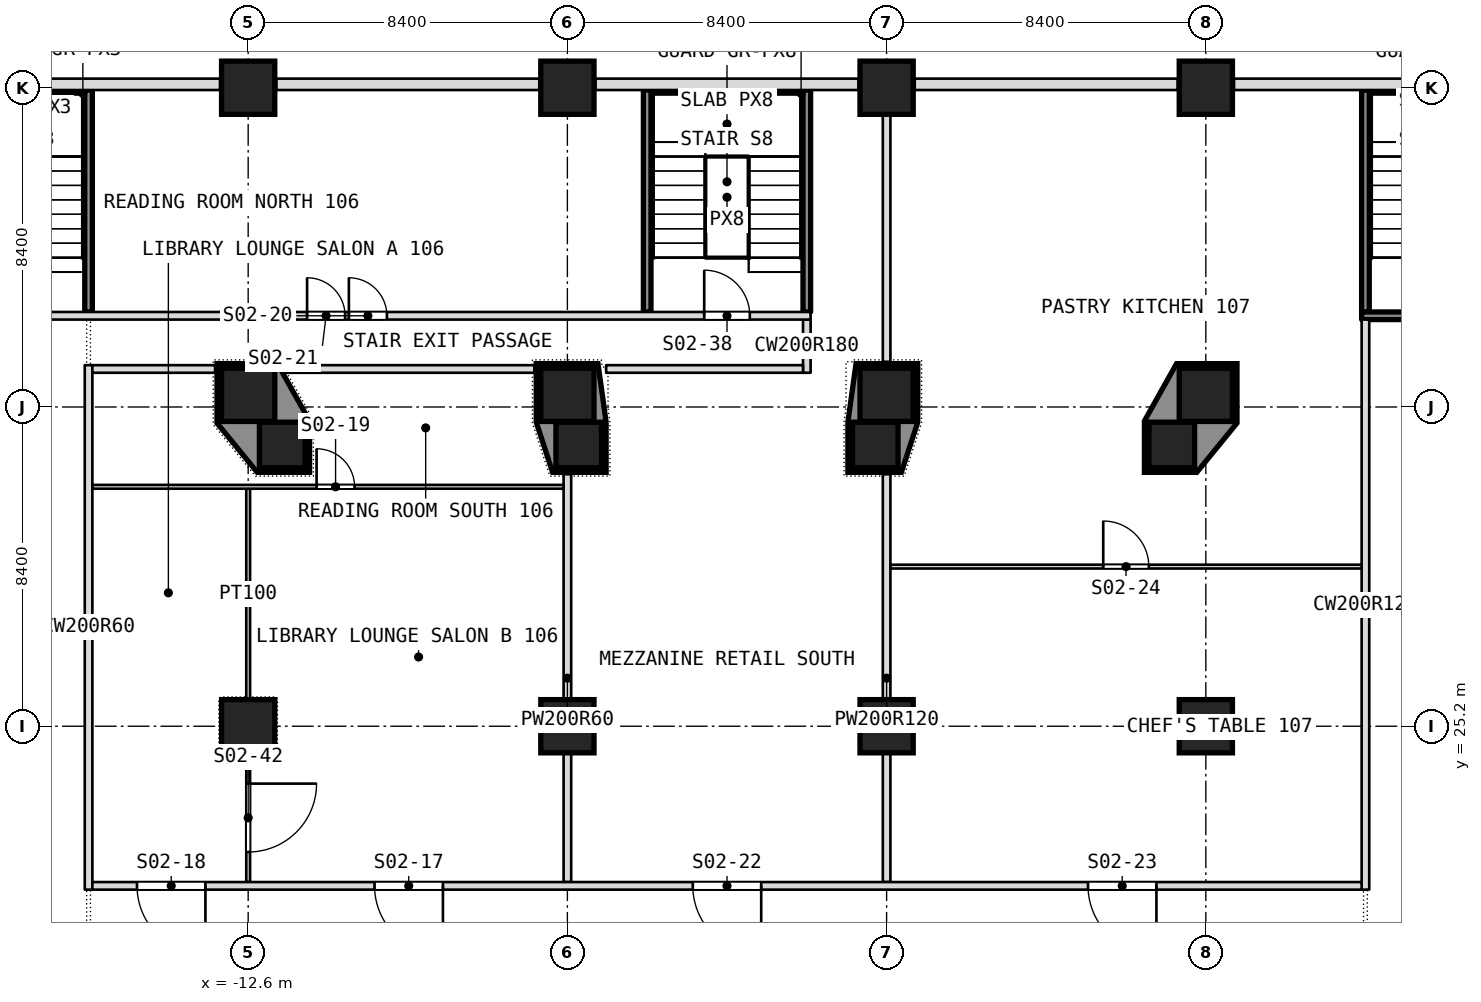
"""IFC4 building model, lengths in metres.
Left out: names, types, materials, properties, quantities, classifications, styles, units other than length and angle.
Written with IfcOpenShell. Run it as: python <this file> out.ifc"""

import sys

from ifc_helpers import new_model, si_unit, direction, frame, frame_2d, origin, origin_2d, place, context, subcontext, project, spatial, polyline, rectangle, outline, extrude, element, fill, save


model = new_model("IFC4")
c1 = context("Model", 3, precision=1e-05, world=origin(), true_north=direction((0.0, 1.0)))
c2 = subcontext(c1, "Body", "Model", "MODEL_VIEW")
j1 = project(units=[si_unit("LENGTHUNIT", "METRE"), si_unit("PLANEANGLEUNIT", "RADIAN")], contexts=[c1])
p1 = place(None, origin())
s1 = spatial("IfcSite", under=j1, at=p1, CompositionType="ELEMENT")
p2 = place(p1, origin())
s2 = spatial("IfcBuilding", under=s1, at=p2, CompositionType="ELEMENT")
p3 = place(p2, frame((0.0, 0.0, 8.0)))
s3 = spatial("IfcBuildingStorey", under=s2, at=p3, CompositionType="ELEMENT", Elevation=8.0)
for number, where, z_axis, x_axis in (
    (1, (-12.6, 25.2, 0.0), (0.0, 0.0, 1.0), (1.0, 0.0, 0.0)),
    (2, (-4.2, 25.2, 0.0), (0.0, 0.0, 1.0), (1.0, 0.0, 0.0)),
    (3, (4.2, 25.2, 0.0), (0.0, 0.0, 1.0), (1.0, 0.0, 0.0)),
    (4, (12.6, 25.2, 0.0), (0.0, 0.0, 1.0), (1.0, 0.0, 0.0)),
    (5, (-12.6, 33.92, 0.0), (0.0, 0.0, 1.0), (1.0, 0.0, 0.0)),
    (6, (-4.2, 33.92, 0.0), (0.0, 0.0, 1.0), (1.0, 0.0, 0.0)),
    (7, (4.2, 33.92, 0.0), (0.0, 0.0, 1.0), (1.0, 0.0, 0.0)),
    (8, (12.6, 33.92, 0.0), (0.0, 0.0, 1.0), (1.0, 0.0, 0.0)),
    (9, (-12.6, 42.0, 0.0), (0.0, 0.0, 1.0), (1.0, 0.0, 0.0)),
    (10, (-4.2, 42.0, 0.0), (0.0, 0.0, 1.0), (1.0, 0.0, 0.0)),
    (11, (4.2, 42.0, 0.0), (0.0, 0.0, 1.0), (1.0, 0.0, 0.0)),
    (12, (12.6, 42.0, 0.0), (0.0, 0.0, 1.0), (1.0, 0.0, 0.0)),
):
    element("IfcColumn", number, at=place(p3, frame(where, z_axis=z_axis, x_axis=x_axis)), inside=s3, PredefinedType="COLUMN", context=c2, shape_type="SweptSolid", body=[
        extrude(rectangle(XDim=1.4, YDim=1.4, at=origin_2d()), origin(), (0.0, 0.0, 1.0), 5.0),
    ])
for number, where, z_axis, x_axis in (
    (13, (-11.704, 32.6, 0.0), (0.0, 0.0, 1.0), (1.0, 0.0, 0.0)),
    (14, (-3.901, 32.6, 0.0), (0.0, 0.0, 1.0), (1.0, 0.0, 0.0)),
    (15, (3.901, 32.6, 0.0), (0.0, 0.0, 1.0), (1.0, 0.0, 0.0)),
    (16, (11.704, 32.6, 0.0), (0.0, 0.0, 1.0), (1.0, 0.0, 0.0)),
):
    element("IfcColumn", number, at=place(p3, frame(where, z_axis=z_axis, x_axis=x_axis)), inside=s3, PredefinedType="COLUMN", context=c2, shape_type="SweptSolid", body=[
        extrude(rectangle(XDim=1.2, YDim=1.2, at=origin_2d()), origin(), (0.0, 0.0, 1.0), 5.0),
    ])
p4 = place(p3, frame((16.8, 20.9, 0.0), z_axis=(0.0, 0.0, 1.0), x_axis=(0.0, 1.0, 0.0)))
e17 = element("IfcWall", 17, at=p4, inside=s3, PredefinedType="PARTITIONING", context=c2, shape_type="SweptSolid", body=[
    extrude(rectangle(XDim=15.0, YDim=0.2, at=frame_2d((7.5, 0.0))), origin(), (0.0, 0.0, 1.0), 4.68),
])
p5 = place(p3, frame((16.8, 36.1, 0.0), z_axis=(0.0, 0.0, 1.0), x_axis=(0.0, 1.0, 0.0)))
e18 = element("IfcWall", 18, at=p5, inside=s3, PredefinedType="PARTITIONING", context=c2, shape_type="SweptSolid", body=[
    extrude(rectangle(XDim=5.84, YDim=0.2, at=frame_2d((2.92, 0.0))), origin(), (0.0, 0.0, 1.0), 4.68),
])
p6 = place(p3, frame((4.2, 21.1, 0.0), z_axis=(0.0, 0.0, 1.0), x_axis=(0.0, 1.0, 0.0)))
e19 = element("IfcWall", 19, at=p6, inside=s3, PredefinedType="PARTITIONING", context=c2, shape_type="SweptSolid", body=[
    extrude(rectangle(XDim=10.73, YDim=0.2, at=frame_2d((5.365, 0.0))), origin(), (0.0, 0.0, 1.0), 4.68),
])
p7 = place(p3, frame((4.2, 34.79, 0.0), z_axis=(0.0, 0.0, 1.0), x_axis=(0.0, 1.0, 0.0)))
e20 = element("IfcWall", 20, at=p7, inside=s3, PredefinedType="PARTITIONING", context=c2, shape_type="SweptSolid", body=[
    extrude(rectangle(XDim=7.51, YDim=0.2, at=frame_2d((3.755, 0.0))), origin(), (0.0, 0.0, 1.0), 4.68),
])
p8 = place(p3, frame((2.1, 36.1, 0.0), z_axis=(0.0, 0.0, 1.0), x_axis=(0.0, 1.0, 0.0)))
e21 = element("IfcWall", 21, at=p8, inside=s3, PredefinedType="PARTITIONING", context=c2, shape_type="SweptSolid", body=[
    extrude(rectangle(XDim=5.84, YDim=0.2, at=frame_2d((2.92, 0.0))), origin(), (0.0, 0.0, 1.0), 4.68),
])
p9 = place(p3, frame((2.1, 34.5, 0.0), z_axis=(0.0, 0.0, 1.0), x_axis=(0.0, 1.0, 0.0)))
e22 = element("IfcWall", 22, at=p9, inside=s3, PredefinedType="PARTITIONING", context=c2, shape_type="SweptSolid", body=[
    extrude(rectangle(XDim=1.4, YDim=0.2, at=frame_2d((0.7, 0.0))), origin(), (0.0, 0.0, 1.0), 4.68),
])
p10 = place(p3, frame((-2.1, 36.1, 0.0), z_axis=(0.0, 0.0, 1.0), x_axis=(0.0, 1.0, 0.0)))
e23 = element("IfcWall", 23, at=p10, inside=s3, PredefinedType="PARTITIONING", context=c2, shape_type="SweptSolid", body=[
    extrude(rectangle(XDim=5.84, YDim=0.2, at=frame_2d((2.92, 0.0))), origin(), (0.0, 0.0, 1.0), 4.68),
])
p11 = place(p3, frame((-4.2, 21.1, 0.0), z_axis=(0.0, 0.0, 1.0), x_axis=(0.0, 1.0, 0.0)))
e24 = element("IfcWall", 24, at=p11, inside=s3, PredefinedType="PARTITIONING", context=c2, shape_type="SweptSolid", body=[
    extrude(rectangle(XDim=10.73, YDim=0.2, at=frame_2d((5.365, 0.0))), origin(), (0.0, 0.0, 1.0), 4.68),
])
p12 = place(p3, frame((-12.6, 21.1, 0.0), z_axis=(0.0, 0.0, 1.0), x_axis=(0.0, 1.0, 0.0)))
e25 = element("IfcWall", 25, at=p12, inside=s3, PredefinedType="PARTITIONING", context=c2, shape_type="SweptSolid", body=[
    extrude(rectangle(XDim=3.38, YDim=0.1, at=frame_2d((1.69, 0.0))), origin(), (0.0, 0.0, 1.0), 4.68),
])
p13 = place(p12, frame((0.79, 0.0, 0.0)))
e26 = element("IfcOpeningElement", 26, at=p13, cuts=e25, PredefinedType="OPENING", context=c2, shape_type="SweptSolid", body=[
    extrude(rectangle(XDim=1.8, YDim=2.1, at=frame_2d((0.9, 1.05))), frame((0.0, 0.05, 0.0), z_axis=(0.0, -1.0, 0.0), x_axis=(1.0, 0.0, 0.0)), (0.0, 0.0, 1.0), 0.1),
])
p14 = place(p3, frame((-12.6, 25.92, 0.0), z_axis=(0.0, 0.0, 1.0), x_axis=(0.0, 1.0, 0.0)))
e27 = element("IfcWall", 27, at=p14, inside=s3, PredefinedType="PARTITIONING", context=c2, shape_type="SweptSolid", body=[
    extrude(rectangle(XDim=5.53, YDim=0.1, at=frame_2d((2.765, 0.0))), origin(), (0.0, 0.0, 1.0), 4.68),
])
p15 = place(p3, frame((-16.8, 20.9, 0.0), z_axis=(0.0, 0.0, 1.0), x_axis=(0.0, 1.0, 0.0)))
e28 = element("IfcWall", 28, at=p15, inside=s3, PredefinedType="PARTITIONING", context=c2, shape_type="SweptSolid", body=[
    extrude(rectangle(XDim=13.8, YDim=0.2, at=frame_2d((6.9, 0.0))), origin(), (0.0, 0.0, 1.0), 4.68),
])
p16 = place(p3, frame((-16.8, 36.1, 0.0), z_axis=(0.0, 0.0, 1.0), x_axis=(0.0, 1.0, 0.0)))
e29 = element("IfcWall", 29, at=p16, inside=s3, PredefinedType="PARTITIONING", context=c2, shape_type="SweptSolid", body=[
    extrude(rectangle(XDim=5.84, YDim=0.2, at=frame_2d((2.92, 0.0))), origin(), (0.0, 0.0, 1.0), 4.68),
])
p17 = place(p3, frame((-16.7, 21.0, 0.0), z_axis=(0.0, 0.0, 1.0), x_axis=(1.0, 0.0, 0.0)))
e30 = element("IfcWall", 30, at=p17, inside=s3, PredefinedType="PARTITIONING", context=c2, shape_type="SweptSolid", body=[
    extrude(rectangle(XDim=33.4, YDim=0.2, at=frame_2d((16.7, 0.0))), origin(), (0.0, 0.0, 1.0), 4.68),
])
p18 = place(p17, frame((7.425, 0.0, 0.0)))
e31 = element("IfcOpeningElement", 31, at=p18, cuts=e30, PredefinedType="OPENING", context=c2, shape_type="SweptSolid", body=[
    extrude(rectangle(XDim=1.8, YDim=2.1, at=frame_2d((0.9, 1.05))), frame((0.0, 0.1, 0.0), z_axis=(0.0, -1.0, 0.0), x_axis=(1.0, 0.0, 0.0)), (0.0, 0.0, 1.0), 0.2),
])
p19 = place(p17, frame((1.175, 0.0, 0.0)))
e32 = element("IfcOpeningElement", 32, at=p19, cuts=e30, PredefinedType="OPENING", context=c2, shape_type="SweptSolid", body=[
    extrude(rectangle(XDim=1.8, YDim=2.1, at=frame_2d((0.9, 1.05))), frame((0.0, 0.1, 0.0), z_axis=(0.0, -1.0, 0.0), x_axis=(1.0, 0.0, 0.0)), (0.0, 0.0, 1.0), 0.2),
])
p20 = place(p17, frame((15.8, 0.0, 0.0)))
e33 = element("IfcOpeningElement", 33, at=p20, cuts=e30, PredefinedType="OPENING", context=c2, shape_type="SweptSolid", body=[
    extrude(rectangle(XDim=1.8, YDim=2.1, at=frame_2d((0.9, 1.05))), frame((0.0, 0.1, 0.0), z_axis=(0.0, -1.0, 0.0), x_axis=(1.0, 0.0, 0.0)), (0.0, 0.0, 1.0), 0.2),
])
p21 = place(p17, frame((26.2, 0.0, 0.0)))
e34 = element("IfcOpeningElement", 34, at=p21, cuts=e30, PredefinedType="OPENING", context=c2, shape_type="SweptSolid", body=[
    extrude(rectangle(XDim=1.8, YDim=2.1, at=frame_2d((0.9, 1.05))), frame((0.0, 0.1, 0.0), z_axis=(0.0, -1.0, 0.0), x_axis=(1.0, 0.0, 0.0)), (0.0, 0.0, 1.0), 0.2),
])
p22 = place(p3, frame((4.3, 29.4, 0.0), z_axis=(0.0, 0.0, 1.0), x_axis=(1.0, 0.0, 0.0)))
e35 = element("IfcWall", 35, at=p22, inside=s3, PredefinedType="PARTITIONING", context=c2, shape_type="SweptSolid", body=[
    extrude(rectangle(XDim=12.4, YDim=0.1, at=frame_2d((6.2, 0.0))), origin(), (0.0, 0.0, 1.0), 4.68),
])
p23 = place(p22, frame((5.6, 0.0, 0.0)))
e36 = element("IfcOpeningElement", 36, at=p23, cuts=e35, PredefinedType="OPENING", context=c2, shape_type="SweptSolid", body=[
    extrude(rectangle(XDim=1.2, YDim=2.1, at=frame_2d((0.6, 1.05))), frame((0.0, 0.05, 0.0), z_axis=(0.0, -1.0, 0.0), x_axis=(1.0, 0.0, 0.0)), (0.0, 0.0, 1.0), 0.1),
])
p24 = place(p3, frame((-16.7, 31.5, 0.0), z_axis=(0.0, 0.0, 1.0), x_axis=(1.0, 0.0, 0.0)))
e37 = element("IfcWall", 37, at=p24, inside=s3, PredefinedType="PARTITIONING", context=c2, shape_type="SweptSolid", body=[
    extrude(rectangle(XDim=12.4, YDim=0.1, at=frame_2d((6.2, 0.0))), origin(), (0.0, 0.0, 1.0), 4.68),
])
p25 = place(p24, frame((5.9, 0.0, 0.0)))
e38 = element("IfcOpeningElement", 38, at=p25, cuts=e37, PredefinedType="OPENING", context=c2, shape_type="SweptSolid", body=[
    extrude(rectangle(XDim=1.0, YDim=2.1, at=frame_2d((0.5, 1.05))), frame((0.0, 0.05, 0.0), z_axis=(0.0, -1.0, 0.0), x_axis=(1.0, 0.0, 0.0)), (0.0, 0.0, 1.0), 0.1),
])
p26 = place(p3, frame((-16.7, 34.6, 0.0), z_axis=(0.0, 0.0, 1.0), x_axis=(1.0, 0.0, 0.0)))
e39 = element("IfcWall", 39, at=p26, inside=s3, PredefinedType="PARTITIONING", context=c2, shape_type="SweptSolid", body=[
    extrude(rectangle(XDim=3.23, YDim=0.2, at=frame_2d((1.615, 0.0))), origin(), (0.0, 0.0, 1.0), 4.68),
])
p27 = place(p3, frame((-11.694, 34.6, 0.0), z_axis=(0.0, 0.0, 1.0), x_axis=(1.0, 0.0, 0.0)))
e40 = element("IfcWall", 40, at=p27, inside=s3, PredefinedType="PARTITIONING", context=c2, shape_type="SweptSolid", body=[
    extrude(rectangle(XDim=6.624, YDim=0.2, at=frame_2d((3.312, 0.0))), origin(), (0.0, 0.0, 1.0), 4.68),
])
p28 = place(p3, frame((-3.181, 34.6, 0.0), z_axis=(0.0, 0.0, 1.0), x_axis=(1.0, 0.0, 0.0)))
e41 = element("IfcWall", 41, at=p28, inside=s3, PredefinedType="PARTITIONING", context=c2, shape_type="SweptSolid", body=[
    extrude(rectangle(XDim=5.181, YDim=0.2, at=frame_2d((2.59, 0.0))), origin(), (0.0, 0.0, 1.0), 4.68),
])
p29 = place(p3, frame((-21.1, 36.0, 0.0), z_axis=(0.0, 0.0, 1.0), x_axis=(1.0, 0.0, 0.0)))
e42 = element("IfcWall", 42, at=p29, inside=s3, PredefinedType="PARTITIONING", context=c2, shape_type="SweptSolid", body=[
    extrude(rectangle(XDim=23.3, YDim=0.2, at=frame_2d((11.65, 0.0))), origin(), (0.0, 0.0, 1.0), 4.68),
])
p30 = place(p29, frame((1.6, 0.0, 0.0)))
e43 = element("IfcOpeningElement", 43, at=p30, cuts=e42, PredefinedType="OPENING", context=c2, shape_type="SweptSolid", body=[
    extrude(rectangle(XDim=1.2, YDim=2.1, at=frame_2d((0.6, 1.05))), frame((0.0, 0.1, 0.0), z_axis=(0.0, -1.0, 0.0), x_axis=(1.0, 0.0, 0.0)), (0.0, 0.0, 1.0), 0.2),
])
p31 = place(p29, frame((11.15, 0.0, 0.0)))
e44 = element("IfcOpeningElement", 44, at=p31, cuts=e42, PredefinedType="OPENING", context=c2, shape_type="SweptSolid", body=[
    extrude(rectangle(XDim=1.0, YDim=2.1, at=frame_2d((0.5, 1.05))), frame((0.0, 0.1, 0.0), z_axis=(0.0, -1.0, 0.0), x_axis=(1.0, 0.0, 0.0)), (0.0, 0.0, 1.0), 0.2),
])
p32 = place(p29, frame((10.05, 0.0, 0.0)))
e45 = element("IfcOpeningElement", 45, at=p32, cuts=e42, PredefinedType="OPENING", context=c2, shape_type="SweptSolid", body=[
    extrude(rectangle(XDim=1.0, YDim=2.1, at=frame_2d((0.5, 1.05))), frame((0.0, 0.1, 0.0), z_axis=(0.0, -1.0, 0.0), x_axis=(1.0, 0.0, 0.0)), (0.0, 0.0, 1.0), 0.2),
])
p33 = place(p29, frame((20.5, 0.0, 0.0)))
e46 = element("IfcOpeningElement", 46, at=p33, cuts=e42, PredefinedType="OPENING", context=c2, shape_type="SweptSolid", body=[
    extrude(rectangle(XDim=1.2, YDim=2.1, at=frame_2d((0.6, 1.05))), frame((0.0, 0.1, 0.0), z_axis=(0.0, -1.0, 0.0), x_axis=(1.0, 0.0, 0.0)), (0.0, 0.0, 1.0), 0.2),
])
p34 = place(p3, frame((16.7, 36.0, 0.0), z_axis=(0.0, 0.0, 1.0), x_axis=(1.0, 0.0, 0.0)))
e47 = element("IfcWall", 47, at=p34, inside=s3, PredefinedType="PARTITIONING", context=c2, shape_type="SweptSolid", body=[
    extrude(rectangle(XDim=4.4, YDim=0.2, at=frame_2d((2.2, 0.0))), origin(), (0.0, 0.0, 1.0), 4.68),
])
p35 = place(p34, frame((1.6, 0.0, 0.0)))
e48 = element("IfcOpeningElement", 48, at=p35, cuts=e47, PredefinedType="OPENING", context=c2, shape_type="SweptSolid", body=[
    extrude(rectangle(XDim=1.2, YDim=2.1, at=frame_2d((0.6, 1.05))), frame((0.0, 0.1, 0.0), z_axis=(0.0, -1.0, 0.0), x_axis=(1.0, 0.0, 0.0)), (0.0, 0.0, 1.0), 0.2),
])
p36 = place(p3, frame((20.26, 42.09, 0.0), z_axis=(0.0, 0.0, 1.0), x_axis=(-1.0, 0.0, 0.0)))
e49 = element("IfcWall", 49, at=p36, inside=s3, PredefinedType="NOTDEFINED", context=c2, shape_type="SweptSolid", body=[
    extrude(rectangle(XDim=6.92, YDim=0.3, at=frame_2d((3.46, 0.0))), origin(), (0.0, 0.0, 1.0), 3.78),
])
p37 = place(p3, frame((11.86, 42.09, 0.0), z_axis=(0.0, 0.0, 1.0), x_axis=(-1.0, 0.0, 0.0)))
e50 = element("IfcWall", 50, at=p37, inside=s3, PredefinedType="NOTDEFINED", context=c2, shape_type="SweptSolid", body=[
    extrude(rectangle(XDim=6.92, YDim=0.3, at=frame_2d((3.46, 0.0))), origin(), (0.0, 0.0, 1.0), 3.78),
])
p38 = place(p3, frame((3.46, 42.09, 0.0), z_axis=(0.0, 0.0, 1.0), x_axis=(-1.0, 0.0, 0.0)))
e51 = element("IfcWall", 51, at=p38, inside=s3, PredefinedType="NOTDEFINED", context=c2, shape_type="SweptSolid", body=[
    extrude(rectangle(XDim=6.92, YDim=0.3, at=frame_2d((3.46, 0.0))), origin(), (0.0, 0.0, 1.0), 3.78),
])
p39 = place(p3, frame((-4.94, 42.09, 0.0), z_axis=(0.0, 0.0, 1.0), x_axis=(-1.0, 0.0, 0.0)))
e52 = element("IfcWall", 52, at=p39, inside=s3, PredefinedType="NOTDEFINED", context=c2, shape_type="SweptSolid", body=[
    extrude(rectangle(XDim=6.92, YDim=0.3, at=frame_2d((3.46, 0.0))), origin(), (0.0, 0.0, 1.0), 3.78),
])
p40 = place(p3, frame((-13.34, 42.09, 0.0), z_axis=(0.0, 0.0, 1.0), x_axis=(-1.0, 0.0, 0.0)))
e53 = element("IfcWall", 53, at=p40, inside=s3, PredefinedType="NOTDEFINED", context=c2, shape_type="SweptSolid", body=[
    extrude(rectangle(XDim=6.92, YDim=0.3, at=frame_2d((3.46, 0.0))), origin(), (0.0, 0.0, 1.0), 3.78),
])
p41 = place(p3, origin())
e54 = element("IfcWall", 54, at=p41, inside=s3, PredefinedType="SOLIDWALL", context=c2, shape_type="SweptSolid", body=[
    extrude(outline(polyline([(-13.42, 34.74), (-11.83, 34.74), (-10.984, 33.231), (-10.984, 31.88), (-12.361, 31.88), (-13.42, 33.177), (-13.42, 34.74)]), holes=[polyline([(-11.104, 32.0), (-11.104, 33.2), (-12.304, 33.2), (-12.304, 32.0), (-11.104, 32.0)]), polyline([(-11.9, 33.22), (-11.9, 34.62), (-13.3, 34.62), (-13.3, 33.22), (-11.9, 33.22)])]), origin(), (0.0, 0.0, 1.0), 5.0),
])
p42 = place(p3, origin())
e55 = element("IfcWall", 55, at=p42, inside=s3, PredefinedType="SOLIDWALL", context=c2, shape_type="SweptSolid", body=[
    extrude(outline(polyline([(-5.02, 33.201), (-5.02, 34.74), (-3.396, 34.74), (-3.181, 33.208), (-3.181, 31.88), (-4.588, 31.88), (-5.02, 33.201)]), holes=[polyline([(-4.501, 32.0), (-3.302, 32.0), (-3.302, 33.2), (-4.501, 33.2), (-4.501, 32.0)]), polyline([(-4.9, 33.22), (-3.5, 33.22), (-3.5, 34.62), (-4.9, 34.62), (-4.9, 33.22)])]), origin(), (0.0, 0.0, 1.0), 5.0),
])
p43 = place(p3, origin())
e56 = element("IfcWall", 56, at=p43, inside=s3, PredefinedType="SOLIDWALL", context=c2, shape_type="SweptSolid", body=[
    extrude(outline(polyline([(3.181, 33.208), (3.396, 34.74), (5.02, 34.74), (5.02, 33.201), (4.588, 31.88), (3.181, 31.88), (3.181, 33.208)]), holes=[polyline([(3.5, 33.22), (4.9, 33.22), (4.9, 34.62), (3.5, 34.62), (3.5, 33.22)]), polyline([(3.302, 32.0), (4.501, 32.0), (4.501, 33.2), (3.302, 33.2), (3.302, 32.0)])]), origin(), (0.0, 0.0, 1.0), 5.0),
])
p44 = place(p3, origin())
e57 = element("IfcWall", 57, at=p44, inside=s3, PredefinedType="SOLIDWALL", context=c2, shape_type="SweptSolid", body=[
    extrude(outline(polyline([(11.83, 34.74), (13.42, 34.74), (13.42, 33.177), (12.361, 31.88), (10.984, 31.88), (10.984, 33.231), (11.83, 34.74)]), holes=[polyline([(13.3, 33.22), (13.3, 34.62), (11.9, 34.62), (11.9, 33.22), (13.3, 33.22)]), polyline([(12.304, 32.0), (12.304, 33.2), (11.104, 33.2), (11.104, 32.0), (12.304, 32.0)])]), origin(), (0.0, 0.0, 1.0), 5.0),
])
p45 = place(p13, origin())
e58 = element("IfcDoor", 58, at=p45, inside=s3, OperationType="DOUBLE_DOOR_SINGLE_SWING", PredefinedType="DOOR", context=c2, shape_type="SweptSolid", body=[
    extrude(rectangle(XDim=1.8, YDim=2.1, at=frame_2d((0.9, 1.05))), frame((0.0, 0.025, 0.0), z_axis=(0.0, -1.0, 0.0), x_axis=(1.0, 0.0, 0.0)), (0.0, 0.0, 1.0), 0.05),
])
fill(e26, e58)
p46 = place(p18, origin())
e59 = element("IfcDoor", 59, at=p46, inside=s3, OperationType="DOUBLE_DOOR_SINGLE_SWING", PredefinedType="DOOR", context=c2, shape_type="SweptSolid", body=[
    extrude(rectangle(XDim=1.8, YDim=2.1, at=frame_2d((0.9, 1.05))), frame((0.0, 0.025, 0.0), z_axis=(0.0, -1.0, 0.0), x_axis=(1.0, 0.0, 0.0)), (0.0, 0.0, 1.0), 0.05),
])
fill(e31, e59)
p47 = place(p19, origin())
e60 = element("IfcDoor", 60, at=p47, inside=s3, OperationType="DOUBLE_DOOR_SINGLE_SWING", PredefinedType="DOOR", context=c2, shape_type="SweptSolid", body=[
    extrude(rectangle(XDim=1.8, YDim=2.1, at=frame_2d((0.9, 1.05))), frame((0.0, 0.025, 0.0), z_axis=(0.0, -1.0, 0.0), x_axis=(1.0, 0.0, 0.0)), (0.0, 0.0, 1.0), 0.05),
])
fill(e32, e60)
p48 = place(p20, origin())
e61 = element("IfcDoor", 61, at=p48, inside=s3, OperationType="DOUBLE_DOOR_SINGLE_SWING", PredefinedType="DOOR", context=c2, shape_type="SweptSolid", body=[
    extrude(rectangle(XDim=1.8, YDim=2.1, at=frame_2d((0.9, 1.05))), frame((0.0, 0.025, 0.0), z_axis=(0.0, -1.0, 0.0), x_axis=(1.0, 0.0, 0.0)), (0.0, 0.0, 1.0), 0.05),
])
fill(e33, e61)
p49 = place(p21, origin())
e62 = element("IfcDoor", 62, at=p49, inside=s3, OperationType="DOUBLE_DOOR_SINGLE_SWING", PredefinedType="DOOR", context=c2, shape_type="SweptSolid", body=[
    extrude(rectangle(XDim=1.8, YDim=2.1, at=frame_2d((0.9, 1.05))), frame((0.0, 0.025, 0.0), z_axis=(0.0, -1.0, 0.0), x_axis=(1.0, 0.0, 0.0)), (0.0, 0.0, 1.0), 0.05),
])
fill(e34, e62)
p50 = place(p23, origin())
e63 = element("IfcDoor", 63, at=p50, inside=s3, OperationType="SINGLE_SWING_RIGHT", PredefinedType="DOOR", context=c2, shape_type="SweptSolid", body=[
    extrude(rectangle(XDim=1.2, YDim=2.1, at=frame_2d((0.6, 1.05))), frame((0.0, 0.025, 0.0), z_axis=(0.0, -1.0, 0.0), x_axis=(1.0, 0.0, 0.0)), (0.0, 0.0, 1.0), 0.05),
])
fill(e36, e63)
p51 = place(p25, origin())
e64 = element("IfcDoor", 64, at=p51, inside=s3, OperationType="SINGLE_SWING_LEFT", PredefinedType="DOOR", context=c2, shape_type="SweptSolid", body=[
    extrude(rectangle(XDim=1.0, YDim=2.1, at=frame_2d((0.5, 1.05))), frame((0.0, 0.025, 0.0), z_axis=(0.0, -1.0, 0.0), x_axis=(1.0, 0.0, 0.0)), (0.0, 0.0, 1.0), 0.05),
])
fill(e38, e64)
p52 = place(p31, origin())
e65 = element("IfcDoor", 65, at=p52, inside=s3, OperationType="SINGLE_SWING_LEFT", PredefinedType="DOOR", context=c2, shape_type="SweptSolid", body=[
    extrude(rectangle(XDim=1.0, YDim=2.1, at=frame_2d((0.5, 1.05))), frame((0.0, 0.025, 0.0), z_axis=(0.0, -1.0, 0.0), x_axis=(1.0, 0.0, 0.0)), (0.0, 0.0, 1.0), 0.05),
])
fill(e44, e65)
p53 = place(p32, origin())
e66 = element("IfcDoor", 66, at=p53, inside=s3, OperationType="SINGLE_SWING_LEFT", PredefinedType="DOOR", context=c2, shape_type="SweptSolid", body=[
    extrude(rectangle(XDim=1.0, YDim=2.1, at=frame_2d((0.5, 1.05))), frame((0.0, 0.025, 0.0), z_axis=(0.0, -1.0, 0.0), x_axis=(1.0, 0.0, 0.0)), (0.0, 0.0, 1.0), 0.05),
])
fill(e45, e66)
p54 = place(p33, origin())
e67 = element("IfcDoor", 67, at=p54, inside=s3, OperationType="SINGLE_SWING_RIGHT", PredefinedType="DOOR", context=c2, shape_type="SweptSolid", body=[
    extrude(rectangle(XDim=1.2, YDim=2.1, at=frame_2d((0.6, 1.05))), frame((0.0, 0.025, 0.0), z_axis=(0.0, -1.0, 0.0), x_axis=(1.0, 0.0, 0.0)), (0.0, 0.0, 1.0), 0.05),
])
fill(e46, e67)
save(model, sys.argv[1])
